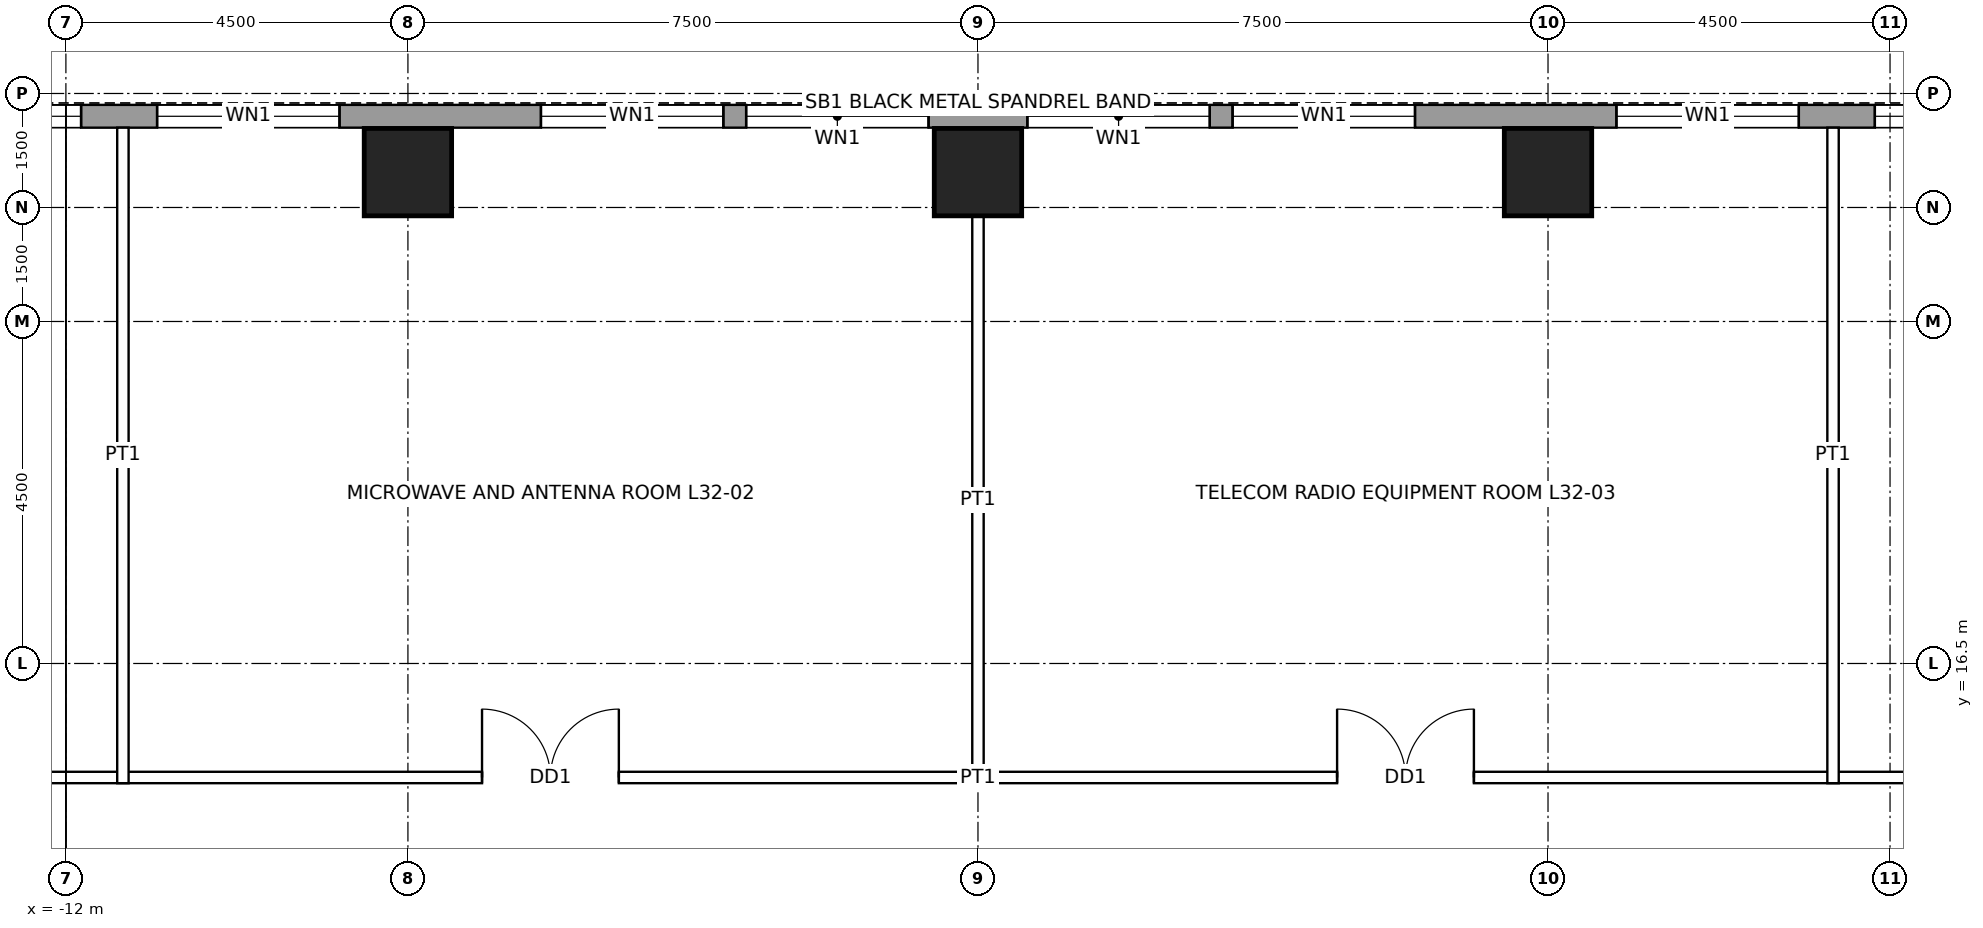
"""IFC4 building model, lengths in metres.
Left out: names, types, materials, properties, quantities, classifications, styles, units other than length and angle.
Written with IfcOpenShell. Run it as: python <this file> out.ifc"""

import sys

from ifc_helpers import new_model, si_unit, direction, frame, frame_2d, origin, origin_2d, place, context, subcontext, project, spatial, rectangle, hollow_rectangle, extrude, element, fill, save


model = new_model("IFC4")
c1 = context("Model", 3, precision=1e-05, world=origin(), true_north=direction((0.0, 1.0)))
c2 = subcontext(c1, "Body", "Model", "MODEL_VIEW")
j1 = project(units=[si_unit("LENGTHUNIT", "METRE"), si_unit("PLANEANGLEUNIT", "RADIAN")], contexts=[c1])
p1 = place(None, origin())
s1 = spatial("IfcSite", under=j1, at=p1, CompositionType="ELEMENT")
p2 = place(p1, origin())
s2 = spatial("IfcBuilding", under=s1, at=p2, CompositionType="ELEMENT")
p3 = place(p2, frame((0.0, 0.0, 158.4)))
s3 = spatial("IfcBuildingStorey", under=s2, at=p3, CompositionType="ELEMENT", Elevation=158.4)
for number, where, z_axis, x_axis in (
    (1, (-7.5, 22.965, 0.0), (0.0, 0.0, 1.0), (1.0, 0.0, 0.0)),
    (2, (0.0, 22.965, 0.0), (0.0, 0.0, 1.0), (1.0, 0.0, 0.0)),
    (3, (7.5, 22.965, 0.0), (0.0, 0.0, 1.0), (1.0, 0.0, 0.0)),
):
    element("IfcColumn", number, at=place(p3, frame(where, z_axis=z_axis, x_axis=x_axis)), inside=s3, PredefinedType="COLUMN", context=c2, shape_type="SweptSolid", body=[
        extrude(hollow_rectangle(XDim=1.15, YDim=1.15, WallThickness=0.075, at=origin_2d()), origin(), (0.0, 0.0, 1.0), 4.5),
    ])
p4 = place(p3, frame((-16.2, 23.7, 0.0), z_axis=(0.0, 0.0, 1.0), x_axis=(1.0, 0.0, 0.0)))
e4 = element("IfcWall", 4, at=p4, inside=s3, PredefinedType="SOLIDWALL", context=c2, shape_type="SweptSolid", body=[
    extrude(rectangle(XDim=32.4, YDim=0.3, at=frame_2d((16.2, 0.0))), origin(), (0.0, 0.0, 1.0), 4.3),
])
p5 = place(p4, frame((2.0, 0.0, 1.0)))
e5 = element("IfcOpeningElement", 5, at=p5, cuts=e4, PredefinedType="OPENING", context=c2, shape_type="SweptSolid", body=[
    extrude(rectangle(XDim=2.4, YDim=1.2, at=frame_2d((1.2, 0.6))), frame((0.0, 0.16, 0.0), z_axis=(0.0, -1.0, 0.0), x_axis=(1.0, 0.0, 0.0)), (0.0, 0.0, 1.0), 0.32),
])
p6 = place(p4, frame((5.4, 0.0, 1.0)))
e6 = element("IfcOpeningElement", 6, at=p6, cuts=e4, PredefinedType="OPENING", context=c2, shape_type="SweptSolid", body=[
    extrude(rectangle(XDim=2.4, YDim=1.2, at=frame_2d((1.2, 0.6))), frame((0.0, 0.16, 0.0), z_axis=(0.0, -1.0, 0.0), x_axis=(1.0, 0.0, 0.0)), (0.0, 0.0, 1.0), 0.32),
])
p7 = place(p4, frame((10.45, 0.0, 1.0)))
e7 = element("IfcOpeningElement", 7, at=p7, cuts=e4, PredefinedType="OPENING", context=c2, shape_type="SweptSolid", body=[
    extrude(rectangle(XDim=2.4, YDim=1.2, at=frame_2d((1.2, 0.6))), frame((0.0, 0.16, 0.0), z_axis=(0.0, -1.0, 0.0), x_axis=(1.0, 0.0, 0.0)), (0.0, 0.0, 1.0), 0.32),
])
p8 = place(p4, frame((13.15, 0.0, 1.0)))
e8 = element("IfcOpeningElement", 8, at=p8, cuts=e4, PredefinedType="OPENING", context=c2, shape_type="SweptSolid", body=[
    extrude(rectangle(XDim=2.4, YDim=1.2, at=frame_2d((1.2, 0.6))), frame((0.0, 0.16, 0.0), z_axis=(0.0, -1.0, 0.0), x_axis=(1.0, 0.0, 0.0)), (0.0, 0.0, 1.0), 0.32),
])
p9 = place(p4, frame((16.85, 0.0, 1.0)))
e9 = element("IfcOpeningElement", 9, at=p9, cuts=e4, PredefinedType="OPENING", context=c2, shape_type="SweptSolid", body=[
    extrude(rectangle(XDim=2.4, YDim=1.2, at=frame_2d((1.2, 0.6))), frame((0.0, 0.16, 0.0), z_axis=(0.0, -1.0, 0.0), x_axis=(1.0, 0.0, 0.0)), (0.0, 0.0, 1.0), 0.32),
])
p10 = place(p4, frame((19.55, 0.0, 1.0)))
e10 = element("IfcOpeningElement", 10, at=p10, cuts=e4, PredefinedType="OPENING", context=c2, shape_type="SweptSolid", body=[
    extrude(rectangle(XDim=2.4, YDim=1.2, at=frame_2d((1.2, 0.6))), frame((0.0, 0.16, 0.0), z_axis=(0.0, -1.0, 0.0), x_axis=(1.0, 0.0, 0.0)), (0.0, 0.0, 1.0), 0.32),
])
p11 = place(p4, frame((24.6, 0.0, 1.0)))
e11 = element("IfcOpeningElement", 11, at=p11, cuts=e4, PredefinedType="OPENING", context=c2, shape_type="SweptSolid", body=[
    extrude(rectangle(XDim=2.4, YDim=1.2, at=frame_2d((1.2, 0.6))), frame((0.0, 0.16, 0.0), z_axis=(0.0, -1.0, 0.0), x_axis=(1.0, 0.0, 0.0)), (0.0, 0.0, 1.0), 0.32),
])
p12 = place(p4, frame((28.0, 0.0, 1.0)))
e12 = element("IfcOpeningElement", 12, at=p12, cuts=e4, PredefinedType="OPENING", context=c2, shape_type="SweptSolid", body=[
    extrude(rectangle(XDim=2.4, YDim=1.2, at=frame_2d((1.2, 0.6))), frame((0.0, 0.16, 0.0), z_axis=(0.0, -1.0, 0.0), x_axis=(1.0, 0.0, 0.0)), (0.0, 0.0, 1.0), 0.32),
])
p13 = place(p3, frame((-15.075, 15.0, 0.0), z_axis=(0.0, 0.0, 1.0), x_axis=(1.0, 0.0, 0.0)))
e13 = element("IfcWall", 13, at=p13, inside=s3, PredefinedType="PARTITIONING", context=c2, shape_type="SweptSolid", body=[
    extrude(rectangle(XDim=30.15, YDim=0.15, at=frame_2d((15.075, 0.0))), origin(), (0.0, 0.0, 1.0), 4.3),
])
p14 = place(p13, frame((8.55, 0.0, 0.0)))
e14 = element("IfcOpeningElement", 14, at=p14, cuts=e13, PredefinedType="OPENING", context=c2, shape_type="SweptSolid", body=[
    extrude(rectangle(XDim=1.8, YDim=2.4, at=frame_2d((0.9, 1.2))), frame((0.0, 0.085, 0.0), z_axis=(0.0, -1.0, 0.0), x_axis=(1.0, 0.0, 0.0)), (0.0, 0.0, 1.0), 0.17),
])
p15 = place(p13, frame((19.8, 0.0, 0.0)))
e15 = element("IfcOpeningElement", 15, at=p15, cuts=e13, PredefinedType="OPENING", context=c2, shape_type="SweptSolid", body=[
    extrude(rectangle(XDim=1.8, YDim=2.4, at=frame_2d((0.9, 1.2))), frame((0.0, 0.085, 0.0), z_axis=(0.0, -1.0, 0.0), x_axis=(1.0, 0.0, 0.0)), (0.0, 0.0, 1.0), 0.17),
])
p16 = place(p13, frame((27.7, 0.0, 0.0)))
e16 = element("IfcOpeningElement", 16, at=p16, cuts=e13, PredefinedType="OPENING", context=c2, shape_type="SweptSolid", body=[
    extrude(rectangle(XDim=1.0, YDim=2.1, at=frame_2d((0.5, 1.05))), frame((0.0, 0.085, 0.0), z_axis=(0.0, -1.0, 0.0), x_axis=(1.0, 0.0, 0.0)), (0.0, 0.0, 1.0), 0.17),
])
p17 = place(p13, frame((1.45, 0.0, 0.0)))
e17 = element("IfcOpeningElement", 17, at=p17, cuts=e13, PredefinedType="OPENING", context=c2, shape_type="SweptSolid", body=[
    extrude(rectangle(XDim=1.0, YDim=2.1, at=frame_2d((0.5, 1.05))), frame((0.0, 0.085, 0.0), z_axis=(0.0, -1.0, 0.0), x_axis=(1.0, 0.0, 0.0)), (0.0, 0.0, 1.0), 0.17),
])
p18 = place(p3, frame((-11.25, 14.925, 0.0), z_axis=(0.0, 0.0, 1.0), x_axis=(0.0, 1.0, 0.0)))
e18 = element("IfcWall", 18, at=p18, inside=s3, PredefinedType="PARTITIONING", context=c2, shape_type="SweptSolid", body=[
    extrude(rectangle(XDim=8.625, YDim=0.15, at=frame_2d((4.312, 0.0))), origin(), (0.0, 0.0, 1.0), 3.431),
])
p19 = place(p3, frame((0.0, 14.925, 0.0), z_axis=(0.0, 0.0, 1.0), x_axis=(0.0, 1.0, 0.0)))
e19 = element("IfcWall", 19, at=p19, inside=s3, PredefinedType="PARTITIONING", context=c2, shape_type="SweptSolid", body=[
    extrude(rectangle(XDim=7.465, YDim=0.15, at=frame_2d((3.732, 0.0))), origin(), (0.0, 0.0, 1.0), 3.431),
])
p20 = place(p3, frame((11.25, 14.925, 0.0), z_axis=(0.0, 0.0, 1.0), x_axis=(0.0, 1.0, 0.0)))
e20 = element("IfcWall", 20, at=p20, inside=s3, PredefinedType="PARTITIONING", context=c2, shape_type="SweptSolid", body=[
    extrude(rectangle(XDim=8.625, YDim=0.15, at=frame_2d((4.312, 0.0))), origin(), (0.0, 0.0, 1.0), 3.431),
])
p21 = place(p5, origin())
e21 = element("IfcWindow", 21, at=p21, inside=s3, PartitioningType="SINGLE_PANEL", PredefinedType="WINDOW", context=c2, shape_type="SweptSolid", body=[
    extrude(rectangle(XDim=2.4, YDim=1.2, at=frame_2d((1.2, 0.6))), frame((0.0, 0.03, 0.0), z_axis=(0.0, -1.0, 0.0), x_axis=(1.0, 0.0, 0.0)), (0.0, 0.0, 1.0), 0.06),
])
fill(e5, e21)
p22 = place(p6, origin())
e22 = element("IfcWindow", 22, at=p22, inside=s3, PartitioningType="SINGLE_PANEL", PredefinedType="WINDOW", context=c2, shape_type="SweptSolid", body=[
    extrude(rectangle(XDim=2.4, YDim=1.2, at=frame_2d((1.2, 0.6))), frame((0.0, 0.03, 0.0), z_axis=(0.0, -1.0, 0.0), x_axis=(1.0, 0.0, 0.0)), (0.0, 0.0, 1.0), 0.06),
])
fill(e6, e22)
p23 = place(p7, origin())
e23 = element("IfcWindow", 23, at=p23, inside=s3, PartitioningType="SINGLE_PANEL", PredefinedType="WINDOW", context=c2, shape_type="SweptSolid", body=[
    extrude(rectangle(XDim=2.4, YDim=1.2, at=frame_2d((1.2, 0.6))), frame((0.0, 0.03, 0.0), z_axis=(0.0, -1.0, 0.0), x_axis=(1.0, 0.0, 0.0)), (0.0, 0.0, 1.0), 0.06),
])
fill(e7, e23)
p24 = place(p8, origin())
e24 = element("IfcWindow", 24, at=p24, inside=s3, PartitioningType="SINGLE_PANEL", PredefinedType="WINDOW", context=c2, shape_type="SweptSolid", body=[
    extrude(rectangle(XDim=2.4, YDim=1.2, at=frame_2d((1.2, 0.6))), frame((0.0, 0.03, 0.0), z_axis=(0.0, -1.0, 0.0), x_axis=(1.0, 0.0, 0.0)), (0.0, 0.0, 1.0), 0.06),
])
fill(e8, e24)
p25 = place(p9, origin())
e25 = element("IfcWindow", 25, at=p25, inside=s3, PartitioningType="SINGLE_PANEL", PredefinedType="WINDOW", context=c2, shape_type="SweptSolid", body=[
    extrude(rectangle(XDim=2.4, YDim=1.2, at=frame_2d((1.2, 0.6))), frame((0.0, 0.03, 0.0), z_axis=(0.0, -1.0, 0.0), x_axis=(1.0, 0.0, 0.0)), (0.0, 0.0, 1.0), 0.06),
])
fill(e9, e25)
p26 = place(p10, origin())
e26 = element("IfcWindow", 26, at=p26, inside=s3, PartitioningType="SINGLE_PANEL", PredefinedType="WINDOW", context=c2, shape_type="SweptSolid", body=[
    extrude(rectangle(XDim=2.4, YDim=1.2, at=frame_2d((1.2, 0.6))), frame((0.0, 0.03, 0.0), z_axis=(0.0, -1.0, 0.0), x_axis=(1.0, 0.0, 0.0)), (0.0, 0.0, 1.0), 0.06),
])
fill(e10, e26)
p27 = place(p11, origin())
e27 = element("IfcWindow", 27, at=p27, inside=s3, PartitioningType="SINGLE_PANEL", PredefinedType="WINDOW", context=c2, shape_type="SweptSolid", body=[
    extrude(rectangle(XDim=2.4, YDim=1.2, at=frame_2d((1.2, 0.6))), frame((0.0, 0.03, 0.0), z_axis=(0.0, -1.0, 0.0), x_axis=(1.0, 0.0, 0.0)), (0.0, 0.0, 1.0), 0.06),
])
fill(e11, e27)
p28 = place(p12, origin())
e28 = element("IfcWindow", 28, at=p28, inside=s3, PartitioningType="SINGLE_PANEL", PredefinedType="WINDOW", context=c2, shape_type="SweptSolid", body=[
    extrude(rectangle(XDim=2.4, YDim=1.2, at=frame_2d((1.2, 0.6))), frame((0.0, 0.03, 0.0), z_axis=(0.0, -1.0, 0.0), x_axis=(1.0, 0.0, 0.0)), (0.0, 0.0, 1.0), 0.06),
])
fill(e12, e28)
p29 = place(p14, origin())
e29 = element("IfcDoor", 29, at=p29, inside=s3, OperationType="DOUBLE_DOOR_SINGLE_SWING", PredefinedType="DOOR", context=c2, shape_type="SweptSolid", body=[
    extrude(rectangle(XDim=1.8, YDim=2.4, at=frame_2d((0.9, 1.2))), frame((0.0, 0.025, 0.0), z_axis=(0.0, -1.0, 0.0), x_axis=(1.0, 0.0, 0.0)), (0.0, 0.0, 1.0), 0.05),
])
fill(e14, e29)
p30 = place(p15, origin())
e30 = element("IfcDoor", 30, at=p30, inside=s3, OperationType="DOUBLE_DOOR_SINGLE_SWING", PredefinedType="DOOR", context=c2, shape_type="SweptSolid", body=[
    extrude(rectangle(XDim=1.8, YDim=2.4, at=frame_2d((0.9, 1.2))), frame((0.0, 0.025, 0.0), z_axis=(0.0, -1.0, 0.0), x_axis=(1.0, 0.0, 0.0)), (0.0, 0.0, 1.0), 0.05),
])
fill(e15, e30)
save(model, sys.argv[1])
